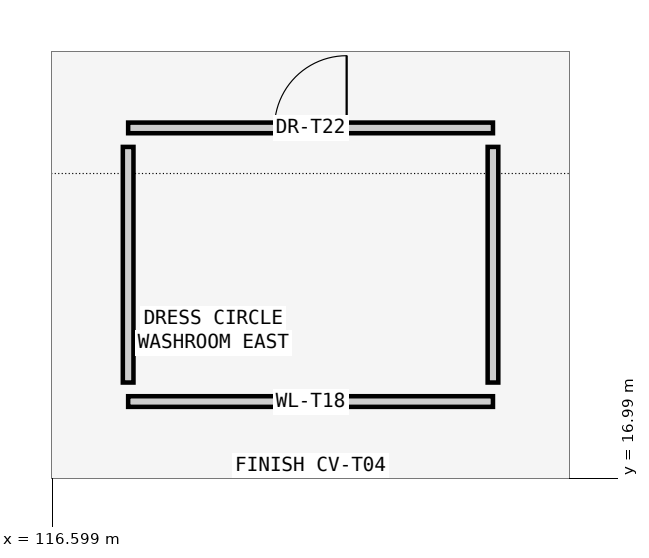
"""IFC4 building model, lengths in metres.
Left out: names, types, materials, properties, quantities, classifications, styles, units other than length and angle.
Written with IfcOpenShell. Run it as: python <this file> out.ifc"""

import sys

from ifc_helpers import new_model, si_unit, direction, frame, frame_2d, origin, place, context, subcontext, project, spatial, rectangle, extrude, element, fill, save


model = new_model("IFC4")
c1 = context("Model", 3, precision=1e-05, world=origin(), true_north=direction((0.0, 1.0)))
c2 = subcontext(c1, "Body", "Model", "MODEL_VIEW")
j1 = project(units=[si_unit("LENGTHUNIT", "METRE"), si_unit("PLANEANGLEUNIT", "RADIAN")], contexts=[c1])
p1 = place(None, origin())
s1 = spatial("IfcSite", under=j1, at=p1, CompositionType="ELEMENT")
p2 = place(p1, origin())
s2 = spatial("IfcBuilding", under=s1, at=p2, CompositionType="ELEMENT")
p3 = place(p2, frame((0.0, 0.0, 10.2)))
s3 = spatial("IfcBuildingStorey", under=s2, at=p3, CompositionType="ELEMENT", Elevation=10.2)
p4 = place(p3, frame((117.6, 18.0, 0.0), z_axis=(0.0, 0.0, 1.0), x_axis=(1.0, 0.0, 0.0)))
e1 = element("IfcWall", 1, at=p4, inside=s3, PredefinedType="PARTITIONING", context=c2, shape_type="SweptSolid", body=[
    extrude(rectangle(XDim=4.8, YDim=0.14, at=frame_2d((2.4, 0.0))), origin(), (0.0, 0.0, 1.0), 4.32),
])
p5 = place(p3, frame((117.6, 21.6, 0.0), z_axis=(0.0, 0.0, 1.0), x_axis=(1.0, 0.0, 0.0)))
e2 = element("IfcWall", 2, at=p5, inside=s3, PredefinedType="PARTITIONING", context=c2, shape_type="SweptSolid", body=[
    extrude(rectangle(XDim=4.8, YDim=0.14, at=frame_2d((2.4, 0.0))), origin(), (0.0, 0.0, 1.0), 4.32),
])
p6 = place(p5, frame((1.925, 0.0, 0.0)))
e3 = element("IfcOpeningElement", 3, at=p6, cuts=e2, PredefinedType="OPENING", context=c2, shape_type="SweptSolid", body=[
    extrude(rectangle(XDim=0.95, YDim=2.15, at=frame_2d((0.475, 1.075))), frame((0.0, 0.08, 0.0), z_axis=(0.0, -1.0, 0.0), x_axis=(1.0, 0.0, 0.0)), (0.0, 0.0, 1.0), 0.16),
])
for number, where, z_axis, x_axis in (
    (4, (117.6, 18.25, 0.0), (0.0, 0.0, 1.0), (0.0, 1.0, 0.0)),
    (5, (122.4, 18.25, 0.0), (0.0, 0.0, 1.0), (0.0, 1.0, 0.0)),
):
    element("IfcWall", number, at=place(p3, frame(where, z_axis=z_axis, x_axis=x_axis)), inside=s3, PredefinedType="PARTITIONING", context=c2, shape_type="SweptSolid", body=[
        extrude(rectangle(XDim=3.1, YDim=0.14, at=frame_2d((1.55, 0.0))), origin(), (0.0, 0.0, 1.0), 4.32),
    ])
p7 = place(p6, origin())
e6 = element("IfcDoor", 6, at=p7, inside=s3, OperationType="SINGLE_SWING_RIGHT", PredefinedType="DOOR", context=c2, shape_type="SweptSolid", body=[
    extrude(rectangle(XDim=0.95, YDim=2.15, at=frame_2d((0.475, 1.075))), frame((0.0, 0.025, 0.0), z_axis=(0.0, -1.0, 0.0), x_axis=(1.0, 0.0, 0.0)), (0.0, 0.0, 1.0), 0.05),
])
fill(e3, e6)
save(model, sys.argv[1])
